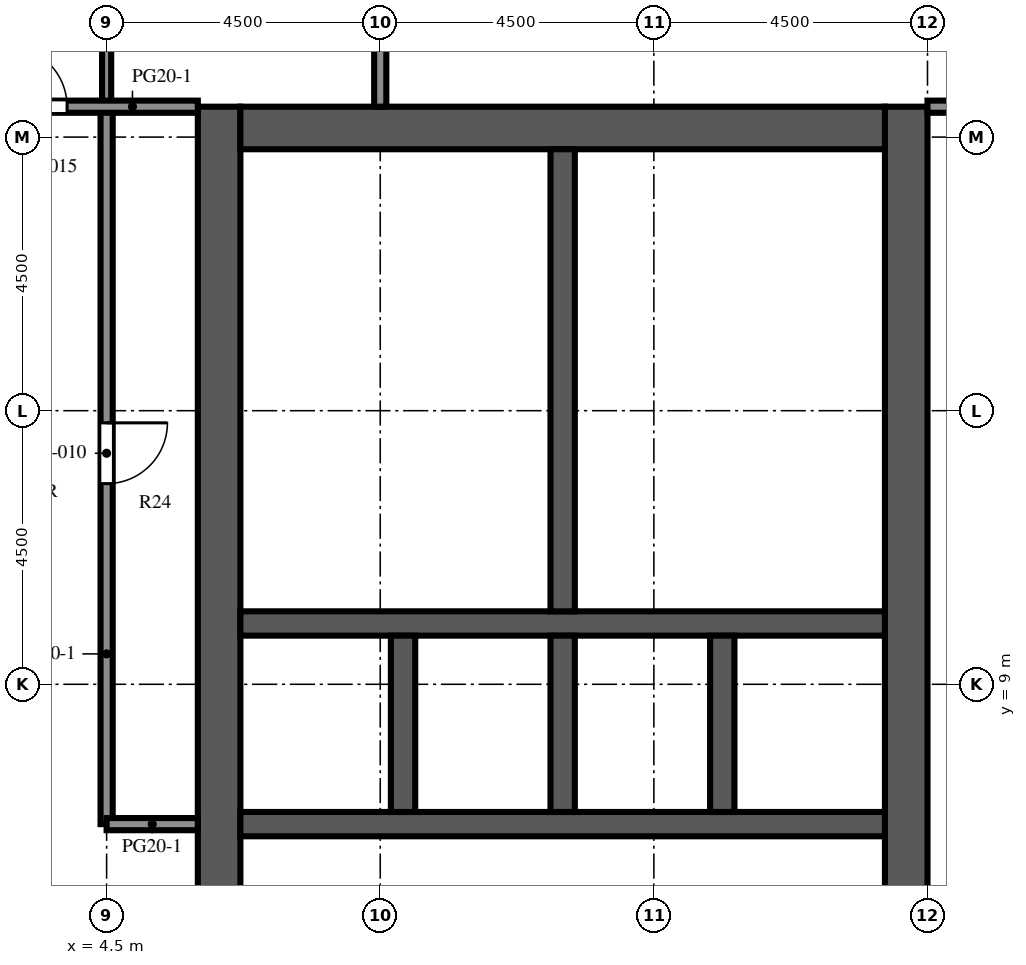
"""IFC4 building model, lengths in metres.
Left out: names, types, materials, properties, quantities, classifications, styles, units other than length and angle.
Written with IfcOpenShell. Run it as: python <this file> out.ifc"""

import sys

from ifc_helpers import new_model, si_unit, direction, frame, frame_2d, origin, place, context, subcontext, project, spatial, rectangle, extrude, element, fill, save


model = new_model("IFC4")
c1 = context("Model", 3, precision=1e-05, world=origin(), true_north=direction((0.0, 1.0)))
c2 = subcontext(c1, "Body", "Model", "MODEL_VIEW")
j1 = project(units=[si_unit("LENGTHUNIT", "METRE"), si_unit("PLANEANGLEUNIT", "RADIAN")], contexts=[c1])
p1 = place(None, origin())
s1 = spatial("IfcSite", under=j1, at=p1, CompositionType="ELEMENT")
p2 = place(p1, origin())
s2 = spatial("IfcBuilding", under=s1, at=p2, CompositionType="ELEMENT")
p3 = place(p2, frame((0.0, 0.0, 282.7)))
s3 = spatial("IfcBuildingStorey", under=s2, at=p3, CompositionType="ELEMENT", Elevation=282.7)
p4 = place(p3, frame((6.35, -9.0, 0.0), z_axis=(0.0, 0.0, 1.0), x_axis=(0.0, 1.0, 0.0)))
e1 = element("IfcWall", 1, at=p4, inside=s3, PredefinedType="SHEAR", context=c2, shape_type="SweptSolid", body=[
    extrude(rectangle(XDim=27.5, YDim=0.7, at=frame_2d((13.75, 0.0))), origin(), (0.0, 0.0, 1.0), 4.1),
])
p5 = place(p4, frame((12.55, 0.0, 0.0)))
e2 = element("IfcOpeningElement", 2, at=p5, cuts=e1, PredefinedType="OPENING", context=c2, shape_type="SweptSolid", body=[
    extrude(rectangle(XDim=2.4, YDim=2.4, at=frame_2d((1.2, 1.2))), frame((0.0, 0.36, 0.0), z_axis=(0.0, -1.0, 0.0), x_axis=(1.0, 0.0, 0.0)), (0.0, 0.0, 1.0), 0.72),
])
p6 = place(p4, frame((3.9, 0.0, 0.0)))
e3 = element("IfcOpeningElement", 3, at=p6, cuts=e1, PredefinedType="OPENING", context=c2, shape_type="SweptSolid", body=[
    extrude(rectangle(XDim=1.2, YDim=2.1, at=frame_2d((0.6, 1.05))), frame((0.0, 0.36, 0.0), z_axis=(0.0, -1.0, 0.0), x_axis=(1.0, 0.0, 0.0)), (0.0, 0.0, 1.0), 0.72),
])
p7 = place(p4, frame((22.4, 0.0, 0.0)))
e4 = element("IfcOpeningElement", 4, at=p7, cuts=e1, PredefinedType="OPENING", context=c2, shape_type="SweptSolid", body=[
    extrude(rectangle(XDim=1.2, YDim=2.1, at=frame_2d((0.6, 1.05))), frame((0.0, 0.36, 0.0), z_axis=(0.0, -1.0, 0.0), x_axis=(1.0, 0.0, 0.0)), (0.0, 0.0, 1.0), 0.72),
])
p8 = place(p3, frame((17.65, -9.0, 0.0), z_axis=(0.0, 0.0, 1.0), x_axis=(0.0, 1.0, 0.0)))
e5 = element("IfcWall", 5, at=p8, inside=s3, PredefinedType="SHEAR", context=c2, shape_type="SweptSolid", body=[
    extrude(rectangle(XDim=27.5, YDim=0.7, at=frame_2d((13.75, 0.0))), origin(), (0.0, 0.0, 1.0), 4.1),
])
p9 = place(p8, frame((12.55, 0.0, 0.0)))
e6 = element("IfcOpeningElement", 6, at=p9, cuts=e5, PredefinedType="OPENING", context=c2, shape_type="SweptSolid", body=[
    extrude(rectangle(XDim=2.4, YDim=2.4, at=frame_2d((1.2, 1.2))), frame((0.0, 0.36, 0.0), z_axis=(0.0, -1.0, 0.0), x_axis=(1.0, 0.0, 0.0)), (0.0, 0.0, 1.0), 0.72),
])
p10 = place(p8, frame((6.825, 0.0, 0.0)))
e7 = element("IfcOpeningElement", 7, at=p10, cuts=e5, PredefinedType="OPENING", context=c2, shape_type="SweptSolid", body=[
    extrude(rectangle(XDim=1.2, YDim=2.1, at=frame_2d((0.6, 1.05))), frame((0.0, 0.36, 0.0), z_axis=(0.0, -1.0, 0.0), x_axis=(1.0, 0.0, 0.0)), (0.0, 0.0, 1.0), 0.72),
])
p11 = place(p8, frame((19.475, 0.0, 0.0)))
e8 = element("IfcOpeningElement", 8, at=p11, cuts=e5, PredefinedType="OPENING", context=c2, shape_type="SweptSolid", body=[
    extrude(rectangle(XDim=1.2, YDim=2.1, at=frame_2d((0.6, 1.05))), frame((0.0, 0.36, 0.0), z_axis=(0.0, -1.0, 0.0), x_axis=(1.0, 0.0, 0.0)), (0.0, 0.0, 1.0), 0.72),
])
p12 = place(p3, frame((6.7, 18.15, 0.0), z_axis=(0.0, 0.0, 1.0), x_axis=(1.0, 0.0, 0.0)))
e9 = element("IfcWall", 9, at=p12, inside=s3, PredefinedType="SHEAR", context=c2, shape_type="SweptSolid", body=[
    extrude(rectangle(XDim=10.6, YDim=0.7, at=frame_2d((5.3, 0.0))), origin(), (0.0, 0.0, 1.0), 4.1),
])
p13 = place(p3, frame((6.7, 6.7, 0.0), z_axis=(0.0, 0.0, 1.0), x_axis=(1.0, 0.0, 0.0)))
e10 = element("IfcWall", 10, at=p13, inside=s3, PredefinedType="SHEAR", context=c2, shape_type="SweptSolid", body=[
    extrude(rectangle(XDim=10.6, YDim=0.4, at=frame_2d((5.3, 0.0))), origin(), (0.0, 0.0, 1.0), 4.1),
])
p14 = place(p13, frame((3.438, 0.0, 0.0)))
e11 = element("IfcOpeningElement", 11, at=p14, cuts=e10, PredefinedType="OPENING", context=c2, shape_type="SweptSolid", body=[
    extrude(rectangle(XDim=1.1, YDim=2.1, at=frame_2d((0.55, 1.05))), frame((0.0, 0.21, 0.0), z_axis=(0.0, -1.0, 0.0), x_axis=(1.0, 0.0, 0.0)), (0.0, 0.0, 1.0), 0.42),
])
p15 = place(p13, frame((6.062, 0.0, 0.0)))
e12 = element("IfcOpeningElement", 12, at=p15, cuts=e10, PredefinedType="OPENING", context=c2, shape_type="SweptSolid", body=[
    extrude(rectangle(XDim=1.1, YDim=2.1, at=frame_2d((0.55, 1.05))), frame((0.0, 0.21, 0.0), z_axis=(0.0, -1.0, 0.0), x_axis=(1.0, 0.0, 0.0)), (0.0, 0.0, 1.0), 0.42),
])
p16 = place(p13, frame((8.812, 0.0, 0.0)))
e13 = element("IfcOpeningElement", 13, at=p16, cuts=e10, PredefinedType="OPENING", context=c2, shape_type="SweptSolid", body=[
    extrude(rectangle(XDim=1.1, YDim=2.1, at=frame_2d((0.55, 1.05))), frame((0.0, 0.21, 0.0), z_axis=(0.0, -1.0, 0.0), x_axis=(1.0, 0.0, 0.0)), (0.0, 0.0, 1.0), 0.42),
])
p17 = place(p13, frame((0.738, 0.0, 0.0)))
e14 = element("IfcOpeningElement", 14, at=p17, cuts=e10, PredefinedType="OPENING", context=c2, shape_type="SweptSolid", body=[
    extrude(rectangle(XDim=1.0, YDim=2.1, at=frame_2d((0.5, 1.05))), frame((0.0, 0.21, 0.0), z_axis=(0.0, -1.0, 0.0), x_axis=(1.0, 0.0, 0.0)), (0.0, 0.0, 1.0), 0.42),
])
p18 = place(p3, frame((6.7, 10.0, 0.0), z_axis=(0.0, 0.0, 1.0), x_axis=(1.0, 0.0, 0.0)))
e15 = element("IfcWall", 15, at=p18, inside=s3, PredefinedType="SHEAR", context=c2, shape_type="SweptSolid", body=[
    extrude(rectangle(XDim=10.6, YDim=0.4, at=frame_2d((5.3, 0.0))), origin(), (0.0, 0.0, 1.0), 4.1),
])
for number, where, z_axis, x_axis in (
    (16, (9.375, 6.9, 0.0), (0.0, 0.0, 1.0), (0.0, 1.0, 0.0)),
    (17, (12.0, 6.9, 0.0), (0.0, 0.0, 1.0), (0.0, 1.0, 0.0)),
    (18, (14.625, 6.9, 0.0), (0.0, 0.0, 1.0), (0.0, 1.0, 0.0)),
):
    element("IfcWall", number, at=place(p3, frame(where, z_axis=z_axis, x_axis=x_axis)), inside=s3, PredefinedType="SHEAR", context=c2, shape_type="SweptSolid", body=[
        extrude(rectangle(XDim=2.9, YDim=0.4, at=frame_2d((1.45, 0.0))), origin(), (0.0, 0.0, 1.0), 4.1),
    ])
p19 = place(p3, frame((12.0, 10.2, 0.0), z_axis=(0.0, 0.0, 1.0), x_axis=(0.0, 1.0, 0.0)))
e19 = element("IfcWall", 19, at=p19, inside=s3, PredefinedType="SHEAR", context=c2, shape_type="SweptSolid", body=[
    extrude(rectangle(XDim=7.6, YDim=0.4, at=frame_2d((3.8, 0.0))), origin(), (0.0, 0.0, 1.0), 4.1),
])
p20 = place(p3, frame((8.1, 10.2, 0.0), z_axis=(0.0, 0.0, 1.0), x_axis=(0.0, 1.0, 0.0)))
e20 = element("IfcWall", 20, at=p20, inside=s3, PredefinedType="PARTITIONING", context=c2, shape_type="SweptSolid", body=[
    extrude(rectangle(XDim=2.28, YDim=0.1, at=frame_2d((1.14, 0.0))), origin(), (0.0, 0.0, 1.0), 3.65),
])
p21 = place(p20, frame((0.64, 0.0, 0.0)))
e21 = element("IfcOpeningElement", 21, at=p21, cuts=e20, PredefinedType="OPENING", context=c2, shape_type="SweptSolid", body=[
    extrude(rectangle(XDim=1.0, YDim=2.1, at=frame_2d((0.5, 1.05))), frame((0.0, 0.06, 0.0), z_axis=(0.0, -1.0, 0.0), x_axis=(1.0, 0.0, 0.0)), (0.0, 0.0, 1.0), 0.12),
])
p22 = place(p3, frame((8.1, 12.48, 0.0), z_axis=(0.0, 0.0, 1.0), x_axis=(0.0, 1.0, 0.0)))
e22 = element("IfcWall", 22, at=p22, inside=s3, PredefinedType="PARTITIONING", context=c2, shape_type="SweptSolid", body=[
    extrude(rectangle(XDim=2.432, YDim=0.1, at=frame_2d((1.216, 0.0))), origin(), (0.0, 0.0, 1.0), 3.65),
])
p23 = place(p22, frame((0.716, 0.0, 0.0)))
e23 = element("IfcOpeningElement", 23, at=p23, cuts=e22, PredefinedType="OPENING", context=c2, shape_type="SweptSolid", body=[
    extrude(rectangle(XDim=1.0, YDim=2.1, at=frame_2d((0.5, 1.05))), frame((0.0, 0.06, 0.0), z_axis=(0.0, -1.0, 0.0), x_axis=(1.0, 0.0, 0.0)), (0.0, 0.0, 1.0), 0.12),
])
p24 = place(p3, frame((8.1, 14.912, 0.0), z_axis=(0.0, 0.0, 1.0), x_axis=(0.0, 1.0, 0.0)))
e24 = element("IfcWall", 24, at=p24, inside=s3, PredefinedType="PARTITIONING", context=c2, shape_type="SweptSolid", body=[
    extrude(rectangle(XDim=2.888, YDim=0.1, at=frame_2d((1.444, 0.0))), origin(), (0.0, 0.0, 1.0), 3.65),
])
p25 = place(p24, frame((0.944, 0.0, 0.0)))
e25 = element("IfcOpeningElement", 25, at=p25, cuts=e24, PredefinedType="OPENING", context=c2, shape_type="SweptSolid", body=[
    extrude(rectangle(XDim=1.0, YDim=2.1, at=frame_2d((0.5, 1.05))), frame((0.0, 0.06, 0.0), z_axis=(0.0, -1.0, 0.0), x_axis=(1.0, 0.0, 0.0)), (0.0, 0.0, 1.0), 0.12),
])
for number, where, z_axis, x_axis in (
    (26, (8.1, 12.48, 0.0), (0.0, 0.0, 1.0), (1.0, 0.0, 0.0)),
    (27, (8.1, 14.912, 0.0), (0.0, 0.0, 1.0), (1.0, 0.0, 0.0)),
):
    element("IfcWall", number, at=place(p3, frame(where, z_axis=z_axis, x_axis=x_axis)), inside=s3, PredefinedType="PARTITIONING", context=c2, shape_type="SweptSolid", body=[
        extrude(rectangle(XDim=3.7, YDim=0.1, at=frame_2d((1.85, 0.0))), origin(), (0.0, 0.0, 1.0), 3.65),
    ])
p26 = place(p3, frame((4.5, 26.6, 0.0), z_axis=(0.0, 0.0, 1.0), x_axis=(0.0, -1.0, 0.0)))
e28 = element("IfcWall", 28, at=p26, inside=s3, PredefinedType="PARTITIONING", context=c2, shape_type="SweptSolid", body=[
    extrude(rectangle(XDim=8.1, YDim=0.15, at=frame_2d((4.05, 0.0))), origin(), (0.0, 0.0, 1.0), 3.65),
])
p27 = place(p26, frame((4.0, 0.0, 0.0)))
e29 = element("IfcOpeningElement", 29, at=p27, cuts=e28, PredefinedType="OPENING", context=c2, shape_type="SweptSolid", body=[
    extrude(rectangle(XDim=1.0, YDim=2.1, at=frame_2d((0.5, 1.05))), frame((0.0, 0.085, 0.0), z_axis=(0.0, -1.0, 0.0), x_axis=(1.0, 0.0, 0.0)), (0.0, 0.0, 1.0), 0.17),
])
p28 = place(p3, frame((4.5, 18.5, 0.0), z_axis=(0.0, 0.0, 1.0), x_axis=(0.0, -1.0, 0.0)))
e30 = element("IfcWall", 30, at=p28, inside=s3, PredefinedType="PARTITIONING", context=c2, shape_type="SweptSolid", body=[
    extrude(rectangle(XDim=11.8, YDim=0.2, at=frame_2d((5.9, 0.0))), origin(), (0.0, 0.0, 1.0), 3.65),
])
p29 = place(p28, frame((5.2, 0.0, 0.0)))
e31 = element("IfcOpeningElement", 31, at=p29, cuts=e30, PredefinedType="OPENING", context=c2, shape_type="SweptSolid", body=[
    extrude(rectangle(XDim=1.0, YDim=2.1, at=frame_2d((0.5, 1.05))), frame((0.0, 0.11, 0.0), z_axis=(0.0, -1.0, 0.0), x_axis=(1.0, 0.0, 0.0)), (0.0, 0.0, 1.0), 0.22),
])
p30 = place(p3, frame((9.0, 18.5, 0.0), z_axis=(0.0, 0.0, 1.0), x_axis=(0.0, 1.0, 0.0)))
e32 = element("IfcWall", 32, at=p30, inside=s3, PredefinedType="PARTITIONING", context=c2, shape_type="SweptSolid", body=[
    extrude(rectangle(XDim=3.5, YDim=0.2, at=frame_2d((1.75, 0.0))), origin(), (0.0, 0.0, 1.0), 3.65),
])
p31 = place(p3, frame((4.5, 6.7, 0.0), z_axis=(0.0, 0.0, 1.0), x_axis=(1.0, 0.0, 0.0)))
e33 = element("IfcWall", 33, at=p31, inside=s3, PredefinedType="PARTITIONING", context=c2, shape_type="SweptSolid", body=[
    extrude(rectangle(XDim=1.5, YDim=0.2, at=frame_2d((0.75, 0.0))), origin(), (0.0, 0.0, 1.0), 3.65),
])
p32 = place(p3, frame((1.5, 18.5, 0.0), z_axis=(0.0, 0.0, 1.0), x_axis=(1.0, 0.0, 0.0)))
e34 = element("IfcWall", 34, at=p32, inside=s3, PredefinedType="PARTITIONING", context=c2, shape_type="SweptSolid", body=[
    extrude(rectangle(XDim=4.5, YDim=0.2, at=frame_2d((2.25, 0.0))), origin(), (0.0, 0.0, 1.0), 3.65),
])
p33 = place(p32, frame((1.35, 0.0, 0.0)))
e35 = element("IfcOpeningElement", 35, at=p33, cuts=e34, PredefinedType="OPENING", context=c2, shape_type="SweptSolid", body=[
    extrude(rectangle(XDim=1.0, YDim=2.1, at=frame_2d((0.5, 1.05))), frame((0.0, 0.11, 0.0), z_axis=(0.0, -1.0, 0.0), x_axis=(1.0, 0.0, 0.0)), (0.0, 0.0, 1.0), 0.22),
])
p34 = place(p3, frame((18.0, 18.5, 0.0), z_axis=(0.0, 0.0, 1.0), x_axis=(1.0, 0.0, 0.0)))
e36 = element("IfcWall", 36, at=p34, inside=s3, PredefinedType="PARTITIONING", context=c2, shape_type="SweptSolid", body=[
    extrude(rectangle(XDim=4.201, YDim=0.2, at=frame_2d((2.101, 0.0))), origin(), (0.0, 0.0, 1.0), 3.65),
])
p35 = place(p34, frame((1.35, 0.0, 0.0)))
e37 = element("IfcOpeningElement", 37, at=p35, cuts=e36, PredefinedType="OPENING", context=c2, shape_type="SweptSolid", body=[
    extrude(rectangle(XDim=1.0, YDim=2.1, at=frame_2d((0.5, 1.05))), frame((0.0, 0.11, 0.0), z_axis=(0.0, -1.0, 0.0), x_axis=(1.0, 0.0, 0.0)), (0.0, 0.0, 1.0), 0.22),
])
p36 = place(p14, origin())
e38 = element("IfcDoor", 38, at=p36, inside=s3, OperationType="DOUBLE_DOOR_SLIDING", PredefinedType="DOOR", context=c2, shape_type="SweptSolid", body=[
    extrude(rectangle(XDim=1.1, YDim=2.1, at=frame_2d((0.55, 1.05))), frame((0.0, 0.025, 0.0), z_axis=(0.0, -1.0, 0.0), x_axis=(1.0, 0.0, 0.0)), (0.0, 0.0, 1.0), 0.05),
])
fill(e11, e38)
p37 = place(p15, origin())
e39 = element("IfcDoor", 39, at=p37, inside=s3, OperationType="DOUBLE_DOOR_SLIDING", PredefinedType="DOOR", context=c2, shape_type="SweptSolid", body=[
    extrude(rectangle(XDim=1.1, YDim=2.1, at=frame_2d((0.55, 1.05))), frame((0.0, 0.025, 0.0), z_axis=(0.0, -1.0, 0.0), x_axis=(1.0, 0.0, 0.0)), (0.0, 0.0, 1.0), 0.05),
])
fill(e12, e39)
p38 = place(p16, origin())
e40 = element("IfcDoor", 40, at=p38, inside=s3, OperationType="DOUBLE_DOOR_SLIDING", PredefinedType="DOOR", context=c2, shape_type="SweptSolid", body=[
    extrude(rectangle(XDim=1.1, YDim=2.1, at=frame_2d((0.55, 1.05))), frame((0.0, 0.025, 0.0), z_axis=(0.0, -1.0, 0.0), x_axis=(1.0, 0.0, 0.0)), (0.0, 0.0, 1.0), 0.05),
])
fill(e13, e40)
p39 = place(p5, origin())
e41 = element("IfcDoor", 41, at=p39, inside=s3, OperationType="DOUBLE_DOOR_DOUBLE_SWING", PredefinedType="DOOR", context=c2, shape_type="SweptSolid", body=[
    extrude(rectangle(XDim=2.4, YDim=2.4, at=frame_2d((1.2, 1.2))), frame((0.0, 0.025, 0.0), z_axis=(0.0, -1.0, 0.0), x_axis=(1.0, 0.0, 0.0)), (0.0, 0.0, 1.0), 0.05),
])
fill(e2, e41)
p40 = place(p9, origin())
e42 = element("IfcDoor", 42, at=p40, inside=s3, OperationType="DOUBLE_DOOR_DOUBLE_SWING", PredefinedType="DOOR", context=c2, shape_type="SweptSolid", body=[
    extrude(rectangle(XDim=2.4, YDim=2.4, at=frame_2d((1.2, 1.2))), frame((0.0, 0.025, 0.0), z_axis=(0.0, -1.0, 0.0), x_axis=(1.0, 0.0, 0.0)), (0.0, 0.0, 1.0), 0.05),
])
fill(e6, e42)
p41 = place(p11, frame((1.2, 0.0, 0.0), z_axis=(0.0, 0.0, 1.0), x_axis=(-1.0, 0.0, 0.0)))
e43 = element("IfcDoor", 43, at=p41, inside=s3, OperationType="SINGLE_SWING_LEFT", PredefinedType="DOOR", context=c2, shape_type="SweptSolid", body=[
    extrude(rectangle(XDim=1.2, YDim=2.1, at=frame_2d((0.6, 1.05))), frame((0.0, 0.025, 0.0), z_axis=(0.0, -1.0, 0.0), x_axis=(1.0, 0.0, 0.0)), (0.0, 0.0, 1.0), 0.05),
])
fill(e8, e43)
p42 = place(p17, origin())
e44 = element("IfcDoor", 44, at=p42, inside=s3, OperationType="SINGLE_SWING_LEFT", PredefinedType="DOOR", context=c2, shape_type="SweptSolid", body=[
    extrude(rectangle(XDim=1.0, YDim=2.1, at=frame_2d((0.5, 1.05))), frame((0.0, 0.025, 0.0), z_axis=(0.0, -1.0, 0.0), x_axis=(1.0, 0.0, 0.0)), (0.0, 0.0, 1.0), 0.05),
])
fill(e14, e44)
p43 = place(p7, origin())
e45 = element("IfcDoor", 45, at=p43, inside=s3, OperationType="SINGLE_SWING_RIGHT", PredefinedType="DOOR", context=c2, shape_type="SweptSolid", body=[
    extrude(rectangle(XDim=1.2, YDim=2.1, at=frame_2d((0.6, 1.05))), frame((0.0, -0.275, 0.0), z_axis=(0.0, -1.0, 0.0), x_axis=(1.0, 0.0, 0.0)), (0.0, 0.0, 1.0), 0.05),
])
fill(e4, e45)
p44 = place(p21, origin())
e46 = element("IfcDoor", 46, at=p44, inside=s3, OperationType="SINGLE_SWING_LEFT", PredefinedType="DOOR", context=c2, shape_type="SweptSolid", body=[
    extrude(rectangle(XDim=1.0, YDim=2.1, at=frame_2d((0.5, 1.05))), frame((0.0, 0.025, 0.0), z_axis=(0.0, -1.0, 0.0), x_axis=(1.0, 0.0, 0.0)), (0.0, 0.0, 1.0), 0.05),
])
fill(e21, e46)
p45 = place(p23, origin())
e47 = element("IfcDoor", 47, at=p45, inside=s3, OperationType="SINGLE_SWING_RIGHT", PredefinedType="DOOR", context=c2, shape_type="SweptSolid", body=[
    extrude(rectangle(XDim=1.0, YDim=2.1, at=frame_2d((0.5, 1.05))), frame((0.0, 0.025, 0.0), z_axis=(0.0, -1.0, 0.0), x_axis=(1.0, 0.0, 0.0)), (0.0, 0.0, 1.0), 0.05),
])
fill(e23, e47)
p46 = place(p25, origin())
e48 = element("IfcDoor", 48, at=p46, inside=s3, OperationType="SINGLE_SWING_LEFT", PredefinedType="DOOR", context=c2, shape_type="SweptSolid", body=[
    extrude(rectangle(XDim=1.0, YDim=2.1, at=frame_2d((0.5, 1.05))), frame((0.0, 0.025, 0.0), z_axis=(0.0, -1.0, 0.0), x_axis=(1.0, 0.0, 0.0)), (0.0, 0.0, 1.0), 0.05),
])
fill(e25, e48)
p47 = place(p29, origin())
e49 = element("IfcDoor", 49, at=p47, inside=s3, OperationType="SINGLE_SWING_LEFT", PredefinedType="DOOR", context=c2, shape_type="SweptSolid", body=[
    extrude(rectangle(XDim=1.0, YDim=2.1, at=frame_2d((0.5, 1.05))), frame((0.0, 0.025, 0.0), z_axis=(0.0, -1.0, 0.0), x_axis=(1.0, 0.0, 0.0)), (0.0, 0.0, 1.0), 0.05),
])
fill(e31, e49)
p48 = place(p33, origin())
e50 = element("IfcDoor", 50, at=p48, inside=s3, OperationType="SINGLE_SWING_LEFT", PredefinedType="DOOR", context=c2, shape_type="SweptSolid", body=[
    extrude(rectangle(XDim=1.0, YDim=2.1, at=frame_2d((0.5, 1.05))), frame((0.0, 0.025, 0.0), z_axis=(0.0, -1.0, 0.0), x_axis=(1.0, 0.0, 0.0)), (0.0, 0.0, 1.0), 0.05),
])
fill(e35, e50)
save(model, sys.argv[1])
